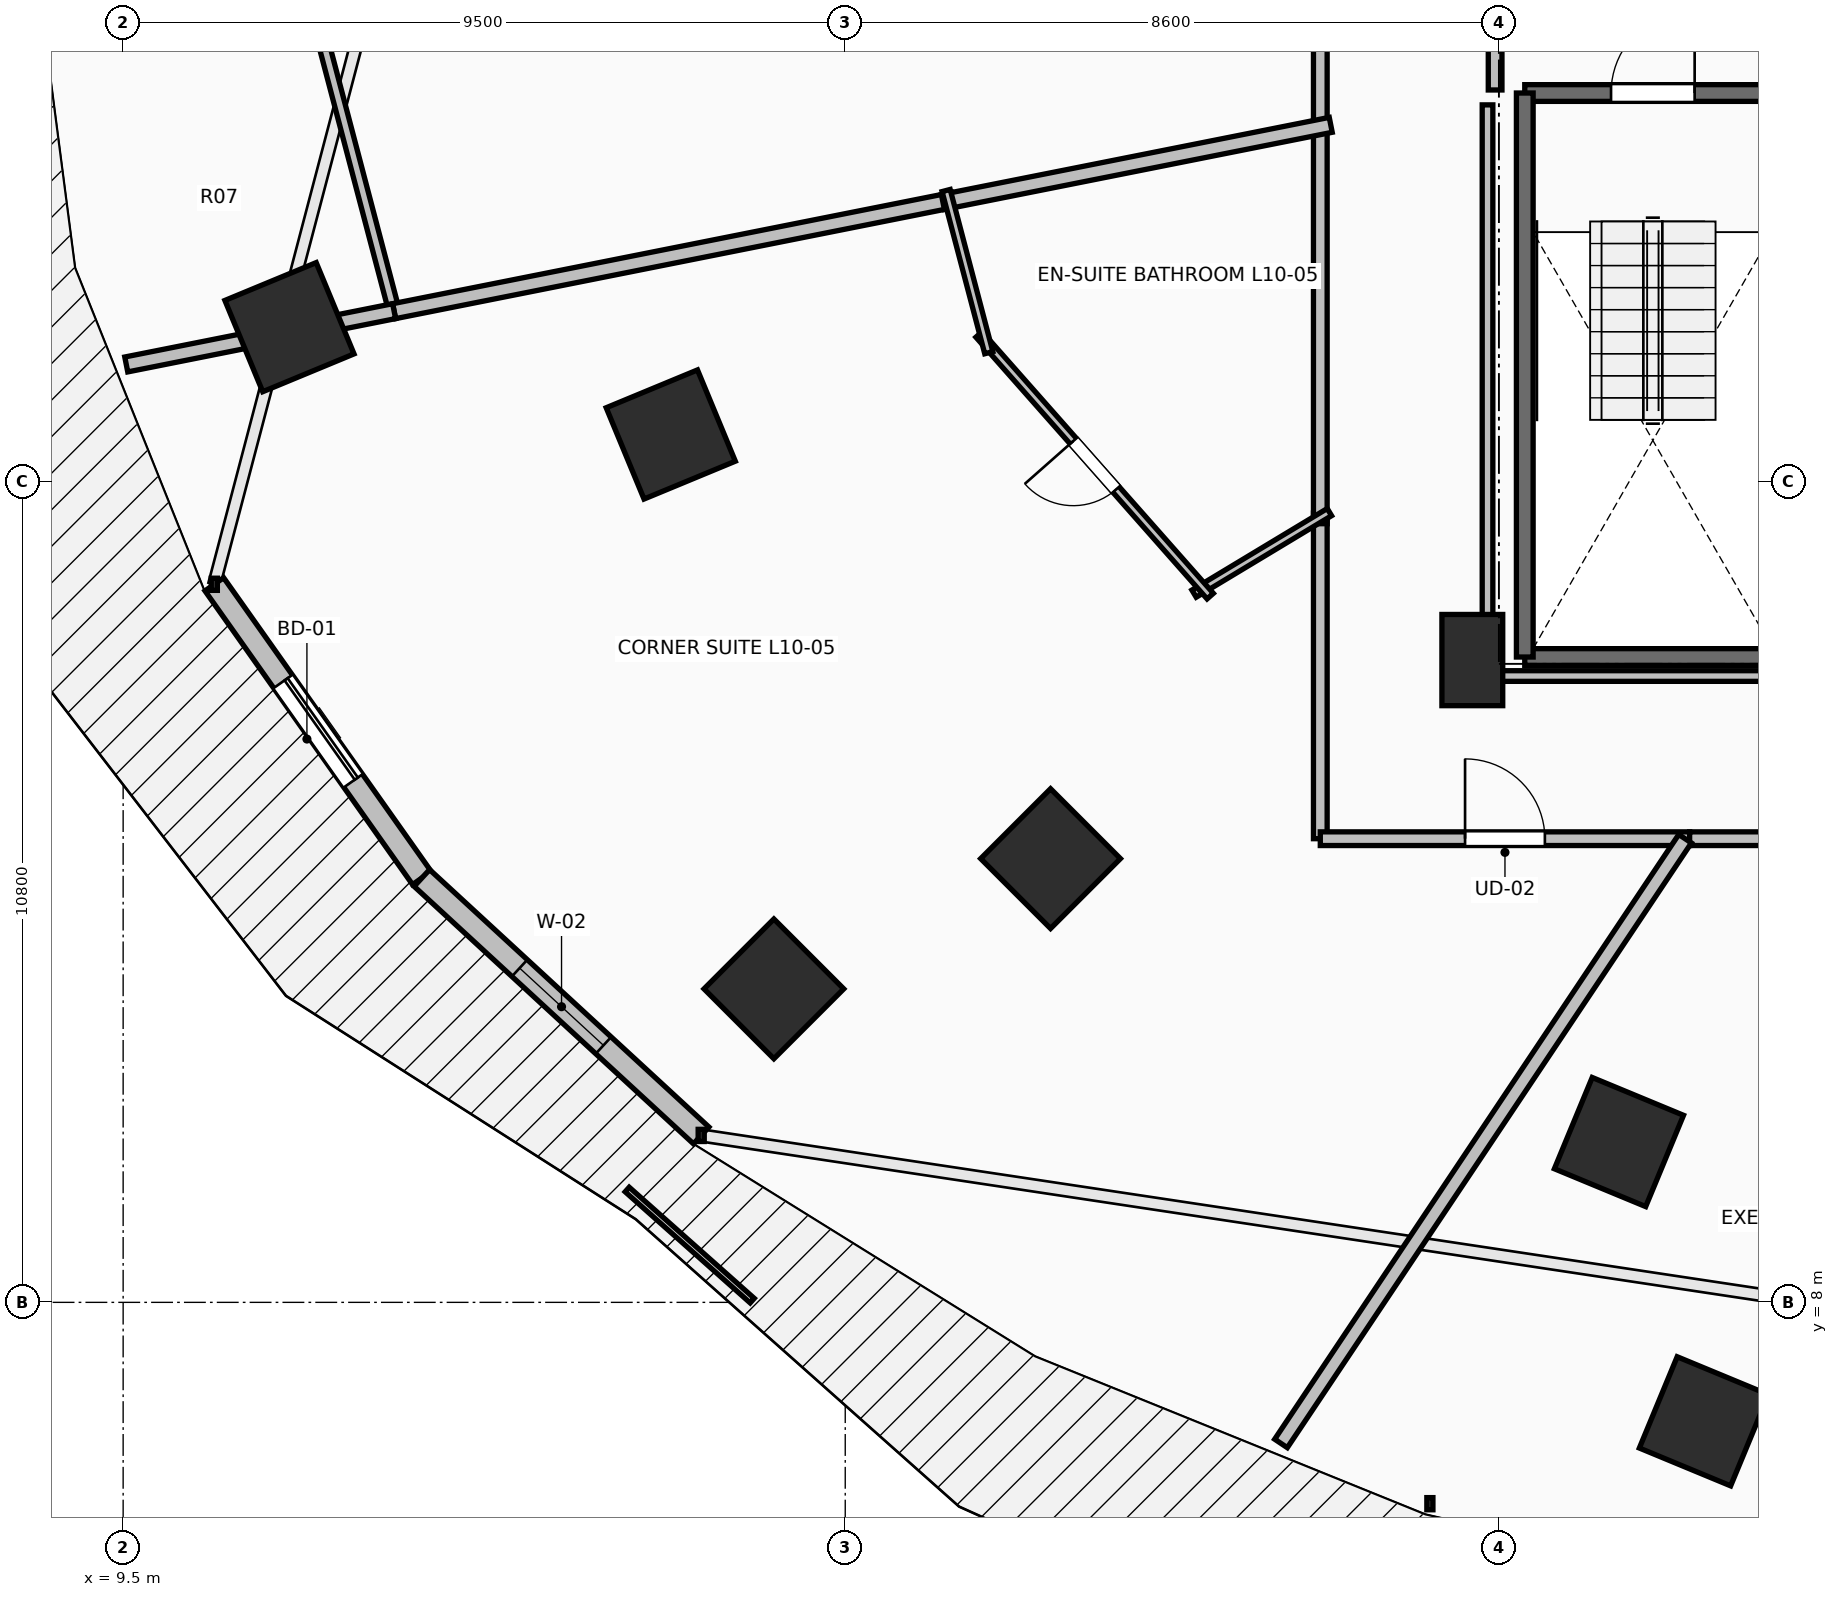
"""IFC4 building model, lengths in metres.
Left out: names, types, materials, properties, quantities, classifications, styles, units other than length and angle.
Written with IfcOpenShell. Run it as: python <this file> out.ifc"""

import sys

from ifc_helpers import new_model, si_unit, direction, frame, frame_2d, origin, origin_2d, place, context, subcontext, project, spatial, rectangle, extrude, element, fill, save


model = new_model("IFC4")
c1 = context("Model", 3, precision=1e-05, world=origin(), true_north=direction((0.0, 1.0)))
c2 = subcontext(c1, "Body", "Model", "MODEL_VIEW")
j1 = project(units=[si_unit("LENGTHUNIT", "METRE"), si_unit("PLANEANGLEUNIT", "RADIAN")], contexts=[c1])
p1 = place(None, origin())
s1 = spatial("IfcSite", under=j1, at=p1, CompositionType="ELEMENT")
p2 = place(p1, origin())
s2 = spatial("IfcBuilding", under=s1, at=p2, CompositionType="ELEMENT")
p3 = place(p2, frame((0.0, 0.0, 41.5)))
s3 = spatial("IfcBuildingStorey", under=s2, at=p3, CompositionType="ELEMENT", Elevation=41.5)
for number, where, z_axis, x_axis in (
    (1, (16.705, 19.418, 0.0), (0.0, 0.0, 1.0), (-0.924, -0.383, 0.0)),
    (2, (21.701, 13.838, 0.0), (0.0, 0.0, 1.0), (-0.707, -0.707, 0.0)),
    (3, (29.179, 10.109, 0.0), (0.0, 0.0, 1.0), (-0.383, -0.924, 0.0)),
    (4, (11.688, 20.83, 0.0), (0.0, 0.0, 1.0), (-0.924, -0.383, 0.0)),
    (5, (18.061, 12.124, 0.0), (0.0, 0.0, 1.0), (-0.707, -0.707, 0.0)),
    (6, (30.297, 6.435, 0.0), (0.0, 0.0, 1.0), (-0.383, -0.924, 0.0)),
):
    element("IfcColumn", number, at=place(p3, frame(where, z_axis=z_axis, x_axis=x_axis)), inside=s3, PredefinedType="COLUMN", context=c2, shape_type="SweptSolid", body=[
        extrude(rectangle(XDim=1.3, YDim=1.3, at=origin_2d()), origin(), (0.0, 0.0, 1.0), 3.5),
    ])
p4 = place(p3, frame((27.25, 16.45, 0.0), z_axis=(0.0, 0.0, 1.0), x_axis=(1.0, 0.0, 0.0)))
e7 = element("IfcColumn", 7, at=p4, inside=s3, PredefinedType="PILASTER", context=c2, shape_type="SweptSolid", body=[
    extrude(rectangle(XDim=0.8, YDim=1.2, at=origin_2d()), origin(), (0.0, 0.0, 1.0), 3.5),
])
p5 = place(p3, frame((10.699, 17.447, 0.0), z_axis=(0.0, 0.0, 1.0), x_axis=(0.577130815624, -0.816651713803, 0.0)))
e8 = element("IfcWall", 8, at=p5, inside=s3, PredefinedType="STANDARD", context=c2, shape_type="SweptSolid", body=[
    extrude(rectangle(XDim=4.731, YDim=0.3, at=frame_2d((2.366, 0.0))), origin(), (0.0, 0.0, 1.0), 3.24),
])
p6 = place(p5, frame((1.566, 0.0, 0.0)))
e9 = element("IfcOpeningElement", 9, at=p6, cuts=e8, PredefinedType="OPENING", context=c2, shape_type="SweptSolid", body=[
    extrude(rectangle(XDim=1.6, YDim=2.3, at=frame_2d((0.8, 1.15))), frame((0.0, 0.165, 0.0), z_axis=(0.0, -1.0, 0.0), x_axis=(1.0, 0.0, 0.0)), (0.0, 0.0, 1.0), 0.33),
])
p7 = place(p3, frame((13.43, 13.583, 0.0), z_axis=(0.0, 0.0, 1.0), x_axis=(0.735342629635, -0.677695519419, 0.0)))
e10 = element("IfcWall", 10, at=p7, inside=s3, PredefinedType="STANDARD", context=c2, shape_type="SweptSolid", body=[
    extrude(rectangle(XDim=4.997, YDim=0.3, at=frame_2d((2.499, 0.0))), origin(), (0.0, 0.0, 1.0), 3.24),
])
p8 = place(p7, frame((1.749, 0.0, 0.85)))
e11 = element("IfcOpeningElement", 11, at=p8, cuts=e10, PredefinedType="OPENING", context=c2, shape_type="SweptSolid", body=[
    extrude(rectangle(XDim=1.5, YDim=2.19, at=frame_2d((0.75, 1.095))), frame((0.0, 0.165, 0.0), z_axis=(0.0, -1.0, 0.0), x_axis=(1.0, 0.0, 0.0)), (0.0, 0.0, 1.0), 0.33),
])
p9 = place(p3, frame((27.94, 23.91, 0.0), z_axis=(0.0, 0.0, 1.0), x_axis=(1.0, 0.0, 0.0)))
e12 = element("IfcWall", 12, at=p9, inside=s3, PredefinedType="SOLIDWALL", context=c2, shape_type="SweptSolid", body=[
    extrude(rectangle(XDim=3.37, YDim=0.22, at=frame_2d((1.685, 0.0))), origin(), (0.0, 0.0, 1.0), 3.24),
])
p10 = place(p9, frame((1.135, 0.0, 0.0)))
e13 = element("IfcOpeningElement", 13, at=p10, cuts=e12, PredefinedType="OPENING", context=c2, shape_type="SweptSolid", body=[
    extrude(rectangle(XDim=1.1, YDim=2.15, at=frame_2d((0.55, 1.075))), frame((0.0, 0.125, 0.0), z_axis=(0.0, -1.0, 0.0), x_axis=(1.0, 0.0, 0.0)), (0.0, 0.0, 1.0), 0.25),
])
p11 = place(p3, frame((31.31, 16.49, 0.0), z_axis=(0.0, 0.0, 1.0), x_axis=(-1.0, 0.0, 0.0)))
e14 = element("IfcWall", 14, at=p11, inside=s3, PredefinedType="SOLIDWALL", context=c2, shape_type="SweptSolid", body=[
    extrude(rectangle(XDim=3.37, YDim=0.22, at=frame_2d((1.685, 0.0))), origin(), (0.0, 0.0, 1.0), 3.24),
])
p12 = place(p3, frame((27.94, 16.49, 0.0), z_axis=(0.0, 0.0, 1.0), x_axis=(0.0, 1.0, 0.0)))
e15 = element("IfcWall", 15, at=p12, inside=s3, PredefinedType="SOLIDWALL", context=c2, shape_type="SweptSolid", body=[
    extrude(rectangle(XDim=7.42, YDim=0.22, at=frame_2d((3.71, 0.0))), origin(), (0.0, 0.0, 1.0), 3.24),
])
p13 = place(p3, frame((27.55, 28.0, 0.0), z_axis=(0.0, 0.0, 1.0), x_axis=(0.0, -1.0, 0.0)))
e16 = element("IfcWall", 16, at=p13, inside=s3, PredefinedType="PARTITIONING", context=c2, shape_type="SweptSolid", body=[
    extrude(rectangle(XDim=4.05, YDim=0.18, at=frame_2d((2.025, 0.0))), origin(), (0.0, 0.0, 1.0), 3.24),
])
p14 = place(p13, frame((1.425, 0.0, 0.0)))
e17 = element("IfcOpeningElement", 17, at=p14, cuts=e16, PredefinedType="OPENING", context=c2, shape_type="SweptSolid", body=[
    extrude(rectangle(XDim=1.2, YDim=2.15, at=frame_2d((0.6, 1.075))), frame((0.0, 0.105, 0.0), z_axis=(0.0, -1.0, 0.0), x_axis=(1.0, 0.0, 0.0)), (0.0, 0.0, 1.0), 0.21),
])
p15 = place(p3, frame((25.25, 29.229, 0.0), z_axis=(0.0, 0.0, 1.0), x_axis=(0.0, -1.0, 0.0)))
e18 = element("IfcWall", 18, at=p15, inside=s3, PredefinedType="PARTITIONING", context=c2, shape_type="SweptSolid", body=[
    extrude(rectangle(XDim=5.826, YDim=0.18, at=frame_2d((2.913, 0.0))), origin(), (0.0, 0.0, 1.0), 2.432),
])
p16 = place(p15, frame((2.388, 0.0, 0.0)))
e19 = element("IfcOpeningElement", 19, at=p16, cuts=e18, PredefinedType="OPENING", context=c2, shape_type="SweptSolid", body=[
    extrude(rectangle(XDim=1.05, YDim=2.2, at=frame_2d((0.525, 1.1))), frame((0.0, 0.105, 0.0), z_axis=(0.0, -1.0, 0.0), x_axis=(1.0, 0.0, 0.0)), (0.0, 0.0, 1.0), 0.21),
])
p17 = place(p3, frame((25.25, 18.384, 0.0), z_axis=(0.0, 0.0, 1.0), x_axis=(0.0, -1.0, 0.0)))
e20 = element("IfcWall", 20, at=p17, inside=s3, PredefinedType="PARTITIONING", context=c2, shape_type="SweptSolid", body=[
    extrude(rectangle(XDim=4.284, YDim=0.18, at=frame_2d((2.142, 0.0))), origin(), (0.0, 0.0, 1.0), 2.432),
])
p18 = place(p3, frame((25.25, 14.1, 0.0), z_axis=(0.0, 0.0, 1.0), x_axis=(1.0, 0.0, 0.0)))
e21 = element("IfcWall", 21, at=p18, inside=s3, PredefinedType="PARTITIONING", context=c2, shape_type="SweptSolid", body=[
    extrude(rectangle(XDim=4.859, YDim=0.18, at=frame_2d((2.429, 0.0))), origin(), (0.0, 0.0, 1.0), 2.432),
])
p19 = place(p18, frame((1.905, 0.0, 0.0)))
e22 = element("IfcOpeningElement", 22, at=p19, cuts=e21, PredefinedType="OPENING", context=c2, shape_type="SweptSolid", body=[
    extrude(rectangle(XDim=1.05, YDim=2.2, at=frame_2d((0.525, 1.1))), frame((0.0, 0.105, 0.0), z_axis=(0.0, -1.0, 0.0), x_axis=(1.0, 0.0, 0.0)), (0.0, 0.0, 1.0), 0.21),
])
p20 = place(p3, frame((25.25, 23.543, 0.0), z_axis=(0.0, 0.0, 1.0), x_axis=(0.0, -1.0, 0.0)))
e23 = element("IfcWall", 23, at=p20, inside=s3, PredefinedType="PARTITIONING", context=c2, shape_type="SweptSolid", body=[
    extrude(rectangle(XDim=5.299, YDim=0.18, at=frame_2d((2.649, 0.0))), origin(), (0.0, 0.0, 1.0), 3.24),
])
p21 = place(p3, frame((30.109, 14.1, 0.0), z_axis=(0.0, 0.0, 1.0), x_axis=(1.0, 0.0, 0.0)))
e24 = element("IfcWall", 24, at=p21, inside=s3, PredefinedType="PARTITIONING", context=c2, shape_type="SweptSolid", body=[
    extrude(rectangle(XDim=10.319, YDim=0.18, at=frame_2d((5.16, 0.0))), origin(), (0.0, 0.0, 1.0), 3.24),
])
p22 = place(p21, frame((4.659, 0.0, 0.0)))
e25 = element("IfcOpeningElement", 25, at=p22, cuts=e24, PredefinedType="OPENING", context=c2, shape_type="SweptSolid", body=[
    extrude(rectangle(XDim=1.0, YDim=2.15, at=frame_2d((0.5, 1.075))), frame((0.0, 0.105, 0.0), z_axis=(0.0, -1.0, 0.0), x_axis=(1.0, 0.0, 0.0)), (0.0, 0.0, 1.0), 0.21),
])
p23 = place(p3, frame((11.76, 26.0, 0.0), z_axis=(0.0, 0.0, 1.0), x_axis=(0.254434720755, -0.967089950767, 0.0)))
e26 = element("IfcWall", 26, at=p23, inside=s3, PredefinedType="PARTITIONING", context=c2, shape_type="SweptSolid", body=[
    extrude(rectangle(XDim=5.129, YDim=0.14, at=frame_2d((2.564, 0.0))), origin(), (0.0, 0.0, 1.0), 2.432),
])
p24 = place(p3, frame((13.065, 21.04, 0.0), z_axis=(0.0, 0.0, 1.0), x_axis=(0.980774220135, 0.195145917502, 0.0)))
e27 = element("IfcWall", 27, at=p24, inside=s3, PredefinedType="PARTITIONING", context=c2, shape_type="SweptSolid", body=[
    extrude(rectangle(XDim=7.501, YDim=0.2, at=frame_2d((3.751, 0.0))), origin(), (0.0, 0.0, 1.0), 2.922),
])
p25 = place(p3, frame((20.285, 22.476, 0.0), z_axis=(0.0, 0.0, 1.0), x_axis=(0.980785905074, 0.195087181559, 0.0)))
e28 = element("IfcWall", 28, at=p25, inside=s3, PredefinedType="PARTITIONING", context=c2, shape_type="SweptSolid", body=[
    extrude(rectangle(XDim=5.202, YDim=0.2, at=frame_2d((2.601, 0.0))), origin(), (0.0, 0.0, 1.0), 2.972),
])
p26 = place(p3, frame((9.541, 20.339, 0.0), z_axis=(0.0, 0.0, 1.0), x_axis=(0.980786594985, 0.195083713053, 0.0)))
e29 = element("IfcWall", 29, at=p26, inside=s3, PredefinedType="PARTITIONING", context=c2, shape_type="SweptSolid", body=[
    extrude(rectangle(XDim=3.593, YDim=0.2, at=frame_2d((1.796, 0.0))), origin(), (0.0, 0.0, 1.0), 2.432),
])
p27 = place(p3, frame((25.37, 18.396, 0.0), z_axis=(0.0, 0.0, 1.0), x_axis=(-0.856631627837, -0.515928535932, 0.0)))
e30 = element("IfcWall", 30, at=p27, inside=s3, PredefinedType="PARTITIONING", context=c2, shape_type="SweptSolid", body=[
    extrude(rectangle(XDim=2.079, YDim=0.11, at=frame_2d((1.04, 0.0))), origin(), (0.0, 0.0, 1.0), 2.432),
])
p28 = place(p3, frame((23.802, 17.291, 0.0), z_axis=(0.0, 0.0, 1.0), x_axis=(-0.662071486681, 0.74944068913, 0.0)))
e31 = element("IfcWall", 31, at=p28, inside=s3, PredefinedType="PARTITIONING", context=c2, shape_type="SweptSolid", body=[
    extrude(rectangle(XDim=4.594, YDim=0.11, at=frame_2d((2.297, 0.0))), origin(), (0.0, 0.0, 1.0), 2.432),
])
p29 = place(p28, frame((1.872, 0.0, 0.0)))
e32 = element("IfcOpeningElement", 32, at=p29, cuts=e31, PredefinedType="OPENING", context=c2, shape_type="SweptSolid", body=[
    extrude(rectangle(XDim=0.85, YDim=2.1, at=frame_2d((0.425, 1.05))), frame((0.0, 0.07, 0.0), z_axis=(0.0, -1.0, 0.0), x_axis=(1.0, 0.0, 0.0)), (0.0, 0.0, 1.0), 0.14),
])
p30 = place(p3, frame((20.889, 20.494, 0.0), z_axis=(0.0, 0.0, 1.0), x_axis=(-0.254389812051, 0.967101764823, 0.0)))
e33 = element("IfcWall", 33, at=p30, inside=s3, PredefinedType="PARTITIONING", context=c2, shape_type="SweptSolid", body=[
    extrude(rectangle(XDim=2.206, YDim=0.11, at=frame_2d((1.103, 0.0))), origin(), (0.0, 0.0, 1.0), 3.24),
])
p31 = place(p3, frame((24.733, 6.144, 0.0), z_axis=(0.0, 0.0, 1.0), x_axis=(0.555577192504, 0.831464962082, 0.0)))
e34 = element("IfcWall", 34, at=p31, inside=s3, PredefinedType="PARTITIONING", context=c2, shape_type="SweptSolid", body=[
    extrude(rectangle(XDim=9.569, YDim=0.2, at=frame_2d((4.784, 0.0))), origin(), (0.0, 0.0, 1.0), 2.432),
])
p32 = place(p3, frame((31.195, 16.24, 0.0), z_axis=(0.0, 0.0, 1.0), x_axis=(-1.0, 0.0, 0.0)))
e35 = element("IfcWall", 35, at=p32, inside=s3, PredefinedType="PARTITIONING", context=c2, shape_type="SweptSolid", body=[
    extrude(rectangle(XDim=3.745, YDim=0.14, at=frame_2d((1.873, 0.0))), origin(), (0.0, 0.0, 1.0), 2.432),
])
p33 = place(p3, frame((27.45, 16.24, 0.0), z_axis=(0.0, 0.0, 1.0), x_axis=(0.0, 1.0, 0.0)))
e36 = element("IfcWall", 36, at=p33, inside=s3, PredefinedType="PARTITIONING", context=c2, shape_type="SweptSolid", body=[
    extrude(rectangle(XDim=7.514, YDim=0.14, at=frame_2d((3.757, 0.0))), origin(), (0.0, 0.0, 1.0), 2.432),
])
p34 = place(p6, origin())
e37 = element("IfcDoor", 37, at=p34, inside=s3, OperationType="SLIDING_TO_LEFT", PredefinedType="DOOR", context=c2, shape_type="SweptSolid", body=[
    extrude(rectangle(XDim=1.6, YDim=2.3, at=frame_2d((0.8, 1.15))), frame((0.0, 0.025, 0.0), z_axis=(0.0, -1.0, 0.0), x_axis=(1.0, 0.0, 0.0)), (0.0, 0.0, 1.0), 0.05),
])
fill(e9, e37)
p35 = place(p8, origin())
e38 = element("IfcWindow", 38, at=p35, inside=s3, PartitioningType="SINGLE_PANEL", PredefinedType="WINDOW", context=c2, shape_type="SweptSolid", body=[
    extrude(rectangle(XDim=1.5, YDim=2.19, at=frame_2d((0.75, 1.095))), frame((0.0, 0.03, 0.0), z_axis=(0.0, -1.0, 0.0), x_axis=(1.0, 0.0, 0.0)), (0.0, 0.0, 1.0), 0.06),
])
fill(e11, e38)
p36 = place(p10, origin())
e39 = element("IfcDoor", 39, at=p36, inside=s3, OperationType="SINGLE_SWING_RIGHT", PredefinedType="DOOR", context=c2, shape_type="SweptSolid", body=[
    extrude(rectangle(XDim=1.1, YDim=2.15, at=frame_2d((0.55, 1.075))), frame((0.0, 0.025, 0.0), z_axis=(0.0, -1.0, 0.0), x_axis=(1.0, 0.0, 0.0)), (0.0, 0.0, 1.0), 0.05),
])
fill(e13, e39)
p37 = place(p19, origin())
e40 = element("IfcDoor", 40, at=p37, inside=s3, OperationType="SINGLE_SWING_LEFT", PredefinedType="DOOR", context=c2, shape_type="SweptSolid", body=[
    extrude(rectangle(XDim=1.05, YDim=2.2, at=frame_2d((0.525, 1.1))), frame((0.0, 0.025, 0.0), z_axis=(0.0, -1.0, 0.0), x_axis=(1.0, 0.0, 0.0)), (0.0, 0.0, 1.0), 0.05),
])
fill(e22, e40)
p38 = place(p29, origin())
e41 = element("IfcDoor", 41, at=p38, inside=s3, OperationType="SINGLE_SWING_RIGHT", PredefinedType="DOOR", context=c2, shape_type="SweptSolid", body=[
    extrude(rectangle(XDim=0.85, YDim=2.1, at=frame_2d((0.425, 1.05))), frame((0.0, 0.025, 0.0), z_axis=(0.0, -1.0, 0.0), x_axis=(1.0, 0.0, 0.0)), (0.0, 0.0, 1.0), 0.05),
])
fill(e32, e41)
save(model, sys.argv[1])
